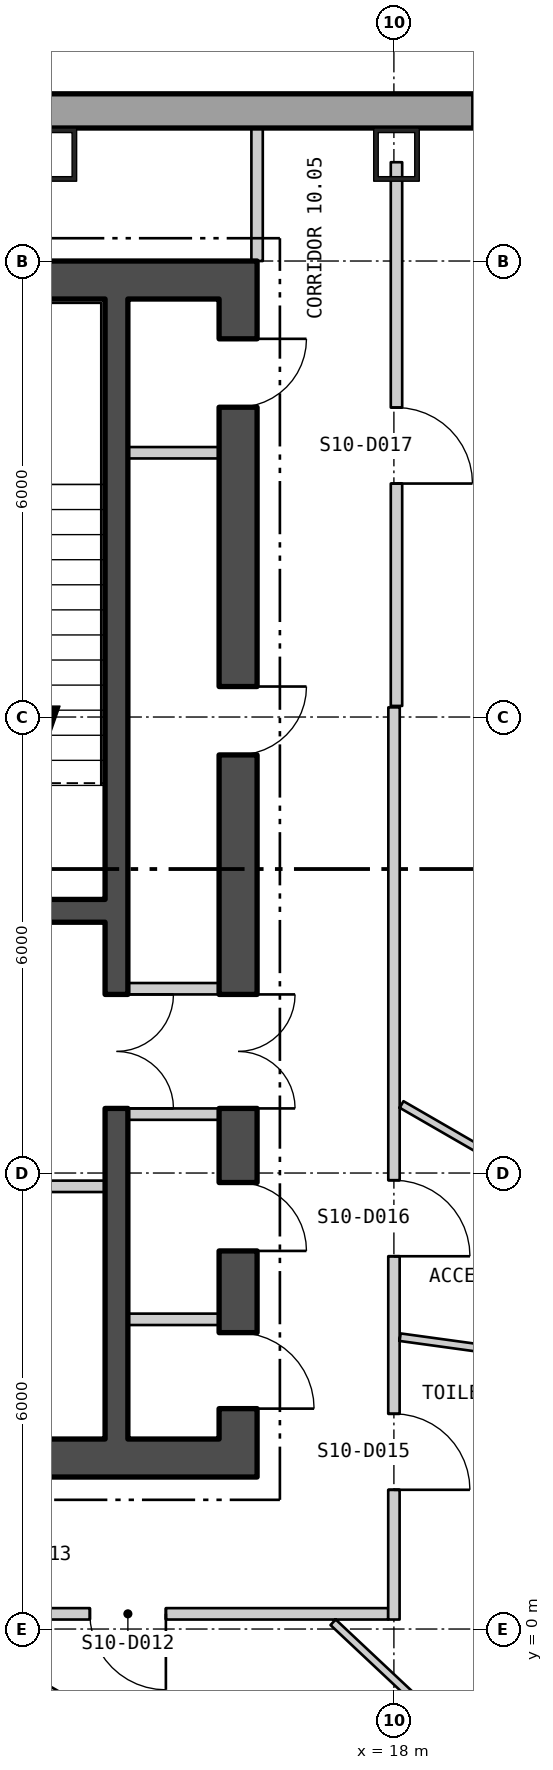
"""IFC4 building model, lengths in metres.
Left out: names, types, materials, properties, quantities, classifications, styles, units other than length and angle.
Written with IfcOpenShell. Run it as: python <this file> out.ifc"""

import sys

from ifc_helpers import new_model, si_unit, direction, frame, frame_2d, origin, origin_2d, place, context, subcontext, project, spatial, polyline, rectangle, hollow_rectangle, outline, extrude, element, fill, save


model = new_model("IFC4")
c1 = context("Model", 3, precision=1e-05, world=origin(), true_north=direction((0.0, 1.0)))
c2 = subcontext(c1, "Body", "Model", "MODEL_VIEW")
j1 = project(units=[si_unit("LENGTHUNIT", "METRE"), si_unit("PLANEANGLEUNIT", "RADIAN")], contexts=[c1])
p1 = place(None, origin())
s1 = spatial("IfcSite", under=j1, at=p1, CompositionType="ELEMENT")
p2 = place(p1, origin())
s2 = spatial("IfcBuilding", under=s1, at=p2, CompositionType="ELEMENT")
p3 = place(p2, frame((0.0, 0.0, 139.8)))
s3 = spatial("IfcBuildingStorey", under=s2, at=p3, CompositionType="ELEMENT", Elevation=139.8)
for number, where, z_axis, x_axis in (
    (1, (18.034, 19.4, 0.0), (0.0, 0.0, 1.0), (-1.0, 0.0, 0.0)),
    (2, (13.526, 19.4, 0.0), (0.0, 0.0, 1.0), (-1.0, 0.0, 0.0)),
):
    element("IfcColumn", number, at=place(p3, frame(where, z_axis=z_axis, x_axis=x_axis)), inside=s3, PredefinedType="COLUMN", context=c2, shape_type="SweptSolid", body=[
        extrude(hollow_rectangle(XDim=0.6, YDim=0.7, WallThickness=0.06, at=origin_2d()), origin(), (0.0, 0.0, 1.0), 3.9),
    ])
p4 = place(p3, frame((22.875, 19.975, -0.4), z_axis=(0.0, 0.0, 1.0), x_axis=(-1.0, 0.0, 0.0)))
e3 = element("IfcWall", 3, at=p4, inside=s3, PredefinedType="SOLIDWALL", context=c2, shape_type="SweptSolid", body=[
    extrude(outline(polyline([(-0.13, -0.225), (45.88, -0.225), (45.62, 0.225), (0.13, 0.225), (-0.13, -0.225)])), origin(), (0.0, 0.0, 1.0), 3.9),
])
p5 = place(p4, frame((1.425, 0.0, 1.3)))
e4 = element("IfcOpeningElement", 4, at=p5, cuts=e3, PredefinedType="OPENING", context=c2, shape_type="SweptSolid", body=[
    extrude(rectangle(XDim=2.4, YDim=2.0, at=frame_2d((1.2, 1.0))), frame((0.0, 0.235, 0.0), z_axis=(0.0, -1.0, 0.0), x_axis=(1.0, 0.0, 0.0)), (0.0, 0.0, 1.0), 0.47),
])
p6 = place(p4, frame((10.403, 0.0, 1.3)))
e5 = element("IfcOpeningElement", 5, at=p6, cuts=e3, PredefinedType="OPENING", context=c2, shape_type="SweptSolid", body=[
    extrude(rectangle(XDim=2.4, YDim=2.0, at=frame_2d((1.2, 1.0))), frame((0.0, 0.235, 0.0), z_axis=(0.0, -1.0, 0.0), x_axis=(1.0, 0.0, 0.0)), (0.0, 0.0, 1.0), 0.47),
])
p7 = place(p4, frame((14.912, 0.0, 1.3)))
e6 = element("IfcOpeningElement", 6, at=p7, cuts=e3, PredefinedType="OPENING", context=c2, shape_type="SweptSolid", body=[
    extrude(rectangle(XDim=2.4, YDim=2.0, at=frame_2d((1.2, 1.0))), frame((0.0, 0.235, 0.0), z_axis=(0.0, -1.0, 0.0), x_axis=(1.0, 0.0, 0.0)), (0.0, 0.0, 1.0), 0.47),
])
p8 = place(p4, frame((19.421, 0.0, 1.3)))
e7 = element("IfcOpeningElement", 7, at=p8, cuts=e3, PredefinedType="OPENING", context=c2, shape_type="SweptSolid", body=[
    extrude(rectangle(XDim=2.4, YDim=2.0, at=frame_2d((1.2, 1.0))), frame((0.0, 0.235, 0.0), z_axis=(0.0, -1.0, 0.0), x_axis=(1.0, 0.0, 0.0)), (0.0, 0.0, 1.0), 0.47),
])
p9 = place(p4, frame((23.929, 0.0, 1.3)))
e8 = element("IfcOpeningElement", 8, at=p9, cuts=e3, PredefinedType="OPENING", context=c2, shape_type="SweptSolid", body=[
    extrude(rectangle(XDim=2.4, YDim=2.0, at=frame_2d((1.2, 1.0))), frame((0.0, 0.235, 0.0), z_axis=(0.0, -1.0, 0.0), x_axis=(1.0, 0.0, 0.0)), (0.0, 0.0, 1.0), 0.47),
])
p10 = place(p4, frame((28.438, 0.0, 1.3)))
e9 = element("IfcOpeningElement", 9, at=p10, cuts=e3, PredefinedType="OPENING", context=c2, shape_type="SweptSolid", body=[
    extrude(rectangle(XDim=2.4, YDim=2.0, at=frame_2d((1.2, 1.0))), frame((0.0, 0.235, 0.0), z_axis=(0.0, -1.0, 0.0), x_axis=(1.0, 0.0, 0.0)), (0.0, 0.0, 1.0), 0.47),
])
p11 = place(p4, frame((32.947, 0.0, 1.3)))
e10 = element("IfcOpeningElement", 10, at=p11, cuts=e3, PredefinedType="OPENING", context=c2, shape_type="SweptSolid", body=[
    extrude(rectangle(XDim=2.4, YDim=2.0, at=frame_2d((1.2, 1.0))), frame((0.0, 0.235, 0.0), z_axis=(0.0, -1.0, 0.0), x_axis=(1.0, 0.0, 0.0)), (0.0, 0.0, 1.0), 0.47),
])
p12 = place(p4, frame((37.455, 0.0, 1.3)))
e11 = element("IfcOpeningElement", 11, at=p12, cuts=e3, PredefinedType="OPENING", context=c2, shape_type="SweptSolid", body=[
    extrude(rectangle(XDim=2.4, YDim=2.0, at=frame_2d((1.2, 1.0))), frame((0.0, 0.235, 0.0), z_axis=(0.0, -1.0, 0.0), x_axis=(1.0, 0.0, 0.0)), (0.0, 0.0, 1.0), 0.47),
])
p13 = place(p4, frame((41.925, 0.0, 1.3)))
e12 = element("IfcOpeningElement", 12, at=p13, cuts=e3, PredefinedType="OPENING", context=c2, shape_type="SweptSolid", body=[
    extrude(rectangle(XDim=2.4, YDim=2.0, at=frame_2d((1.2, 1.0))), frame((0.0, 0.235, 0.0), z_axis=(0.0, -1.0, 0.0), x_axis=(1.0, 0.0, 0.0)), (0.0, 0.0, 1.0), 0.47),
])
p14 = place(p3, frame((4.36, -27.198, -0.18), z_axis=(0.0, 0.0, 1.0), x_axis=(0.500000335318, 0.866025210188, 0.0)))
e13 = element("IfcWall", 13, at=p14, inside=s3, PredefinedType="SOLIDWALL", context=c2, shape_type="SweptSolid", body=[
    extrude(outline(polyline([(-0.13, -0.225), (45.88, -0.225), (45.62, 0.225), (0.13, 0.225), (-0.13, -0.225)])), origin(), (0.0, 0.0, 1.0), 3.68),
])
p15 = place(p14, frame((1.425, 0.0, 1.08)))
e14 = element("IfcOpeningElement", 14, at=p15, cuts=e13, PredefinedType="OPENING", context=c2, shape_type="SweptSolid", body=[
    extrude(rectangle(XDim=2.4, YDim=2.0, at=frame_2d((1.2, 1.0))), frame((0.0, 0.235, 0.0), z_axis=(0.0, -1.0, 0.0), x_axis=(1.0, 0.0, 0.0)), (0.0, 0.0, 1.0), 0.47),
])
p16 = place(p14, frame((5.895, 0.0, 1.08)))
e15 = element("IfcOpeningElement", 15, at=p16, cuts=e13, PredefinedType="OPENING", context=c2, shape_type="SweptSolid", body=[
    extrude(rectangle(XDim=2.4, YDim=2.0, at=frame_2d((1.2, 1.0))), frame((0.0, 0.235, 0.0), z_axis=(0.0, -1.0, 0.0), x_axis=(1.0, 0.0, 0.0)), (0.0, 0.0, 1.0), 0.47),
])
p17 = place(p14, frame((10.403, 0.0, 1.08)))
e16 = element("IfcOpeningElement", 16, at=p17, cuts=e13, PredefinedType="OPENING", context=c2, shape_type="SweptSolid", body=[
    extrude(rectangle(XDim=2.4, YDim=2.0, at=frame_2d((1.2, 1.0))), frame((0.0, 0.235, 0.0), z_axis=(0.0, -1.0, 0.0), x_axis=(1.0, 0.0, 0.0)), (0.0, 0.0, 1.0), 0.47),
])
p18 = place(p14, frame((14.912, 0.0, 1.08)))
e17 = element("IfcOpeningElement", 17, at=p18, cuts=e13, PredefinedType="OPENING", context=c2, shape_type="SweptSolid", body=[
    extrude(rectangle(XDim=2.4, YDim=2.0, at=frame_2d((1.2, 1.0))), frame((0.0, 0.235, 0.0), z_axis=(0.0, -1.0, 0.0), x_axis=(1.0, 0.0, 0.0)), (0.0, 0.0, 1.0), 0.47),
])
p19 = place(p14, frame((19.421, 0.0, 1.08)))
e18 = element("IfcOpeningElement", 18, at=p19, cuts=e13, PredefinedType="OPENING", context=c2, shape_type="SweptSolid", body=[
    extrude(rectangle(XDim=2.4, YDim=2.0, at=frame_2d((1.2, 1.0))), frame((0.0, 0.235, 0.0), z_axis=(0.0, -1.0, 0.0), x_axis=(1.0, 0.0, 0.0)), (0.0, 0.0, 1.0), 0.47),
])
p20 = place(p14, frame((23.929, 0.0, 1.08)))
e19 = element("IfcOpeningElement", 19, at=p20, cuts=e13, PredefinedType="OPENING", context=c2, shape_type="SweptSolid", body=[
    extrude(rectangle(XDim=2.4, YDim=2.0, at=frame_2d((1.2, 1.0))), frame((0.0, 0.235, 0.0), z_axis=(0.0, -1.0, 0.0), x_axis=(1.0, 0.0, 0.0)), (0.0, 0.0, 1.0), 0.47),
])
p21 = place(p14, frame((37.455, 0.0, 1.08)))
e20 = element("IfcOpeningElement", 20, at=p21, cuts=e13, PredefinedType="OPENING", context=c2, shape_type="SweptSolid", body=[
    extrude(rectangle(XDim=2.4, YDim=2.0, at=frame_2d((1.2, 1.0))), frame((0.0, 0.235, 0.0), z_axis=(0.0, -1.0, 0.0), x_axis=(1.0, 0.0, 0.0)), (0.0, 0.0, 1.0), 0.47),
])
p22 = place(p14, frame((41.925, 0.0, 1.08)))
e21 = element("IfcOpeningElement", 21, at=p22, cuts=e13, PredefinedType="OPENING", context=c2, shape_type="SweptSolid", body=[
    extrude(rectangle(XDim=2.4, YDim=2.0, at=frame_2d((1.2, 1.0))), frame((0.0, 0.235, 0.0), z_axis=(0.0, -1.0, 0.0), x_axis=(1.0, 0.0, 0.0)), (0.0, 0.0, 1.0), 0.47),
])
p23 = place(p3, frame((-16.2, 2.25, 0.0), z_axis=(0.0, 0.0, 1.0), x_axis=(1.0, 0.0, 0.0)))
e22 = element("IfcWall", 22, at=p23, inside=s3, PredefinedType="SHEAR", context=c2, shape_type="SweptSolid", body=[
    extrude(rectangle(XDim=32.4, YDim=0.5, at=frame_2d((16.2, 0.0))), origin(), (0.0, 0.0, 1.0), 3.7),
])
p24 = place(p23, frame((10.7, 0.0, 0.0)))
e23 = element("IfcOpeningElement", 23, at=p24, cuts=e22, PredefinedType="OPENING", context=c2, shape_type="SweptSolid", body=[
    extrude(rectangle(XDim=1.8, YDim=2.4, at=frame_2d((0.9, 1.2))), frame((0.0, 0.26, 0.0), z_axis=(0.0, -1.0, 0.0), x_axis=(1.0, 0.0, 0.0)), (0.0, 0.0, 1.0), 0.52),
])
p25 = place(p23, frame((20.7, 0.0, 0.0)))
e24 = element("IfcOpeningElement", 24, at=p25, cuts=e22, PredefinedType="OPENING", context=c2, shape_type="SweptSolid", body=[
    extrude(rectangle(XDim=1.8, YDim=2.4, at=frame_2d((0.9, 1.2))), frame((0.0, 0.26, 0.0), z_axis=(0.0, -1.0, 0.0), x_axis=(1.0, 0.0, 0.0)), (0.0, 0.0, 1.0), 0.52),
])
p26 = place(p3, frame((-16.2, 17.75, 0.0), z_axis=(0.0, 0.0, 1.0), x_axis=(1.0, 0.0, 0.0)))
e25 = element("IfcWall", 25, at=p26, inside=s3, PredefinedType="SHEAR", context=c2, shape_type="SweptSolid", body=[
    extrude(rectangle(XDim=32.4, YDim=0.5, at=frame_2d((16.2, 0.0))), origin(), (0.0, 0.0, 1.0), 3.7),
])
p27 = place(p3, frame((15.95, 2.5, 0.0), z_axis=(0.0, 0.0, 1.0), x_axis=(0.0, 1.0, 0.0)))
e26 = element("IfcWall", 26, at=p27, inside=s3, PredefinedType="SHEAR", context=c2, shape_type="SweptSolid", body=[
    extrude(rectangle(XDim=15.0, YDim=0.5, at=frame_2d((7.5, 0.0))), origin(), (0.0, 0.0, 1.0), 3.7),
])
p28 = place(p27, frame((4.35, 0.0, 0.0)))
e27 = element("IfcOpeningElement", 27, at=p28, cuts=e26, PredefinedType="OPENING", context=c2, shape_type="SweptSolid", body=[
    extrude(rectangle(XDim=1.5, YDim=2.1, at=frame_2d((0.75, 1.05))), frame((0.0, 0.26, 0.0), z_axis=(0.0, -1.0, 0.0), x_axis=(1.0, 0.0, 0.0)), (0.0, 0.0, 1.0), 0.52),
])
p29 = place(p27, frame((0.4, 0.0, 0.0)))
e28 = element("IfcOpeningElement", 28, at=p29, cuts=e26, PredefinedType="OPENING", context=c2, shape_type="SweptSolid", body=[
    extrude(rectangle(XDim=1.0, YDim=2.1, at=frame_2d((0.5, 1.05))), frame((0.0, 0.26, 0.0), z_axis=(0.0, -1.0, 0.0), x_axis=(1.0, 0.0, 0.0)), (0.0, 0.0, 1.0), 0.52),
])
p30 = place(p27, frame((2.475, 0.0, 0.0)))
e29 = element("IfcOpeningElement", 29, at=p30, cuts=e26, PredefinedType="OPENING", context=c2, shape_type="SweptSolid", body=[
    extrude(rectangle(XDim=0.9, YDim=2.1, at=frame_2d((0.45, 1.05))), frame((0.0, 0.26, 0.0), z_axis=(0.0, -1.0, 0.0), x_axis=(1.0, 0.0, 0.0)), (0.0, 0.0, 1.0), 0.52),
])
p31 = place(p27, frame((9.001, 0.0, 0.0)))
e30 = element("IfcOpeningElement", 30, at=p31, cuts=e26, PredefinedType="OPENING", context=c2, shape_type="SweptSolid", body=[
    extrude(rectangle(XDim=0.9, YDim=2.1, at=frame_2d((0.45, 1.05))), frame((0.0, 0.26, 0.0), z_axis=(0.0, -1.0, 0.0), x_axis=(1.0, 0.0, 0.0)), (0.0, 0.0, 1.0), 0.52),
])
p32 = place(p27, frame((13.576, 0.0, 0.0)))
e31 = element("IfcOpeningElement", 31, at=p32, cuts=e26, PredefinedType="OPENING", context=c2, shape_type="SweptSolid", body=[
    extrude(rectangle(XDim=0.9, YDim=2.1, at=frame_2d((0.45, 1.05))), frame((0.0, 0.26, 0.0), z_axis=(0.0, -1.0, 0.0), x_axis=(1.0, 0.0, 0.0)), (0.0, 0.0, 1.0), 0.52),
])
p33 = place(p3, frame((14.35, 2.5, 0.0), z_axis=(0.0, 0.0, 1.0), x_axis=(0.0, 1.0, 0.0)))
e32 = element("IfcWall", 32, at=p33, inside=s3, PredefinedType="SHEAR", context=c2, shape_type="SweptSolid", body=[
    extrude(rectangle(XDim=15.0, YDim=0.3, at=frame_2d((7.5, 0.0))), origin(), (0.0, 0.0, 1.0), 3.7),
])
p34 = place(p33, frame((4.35, 0.0, 0.0)))
e33 = element("IfcOpeningElement", 33, at=p34, cuts=e32, PredefinedType="OPENING", context=c2, shape_type="SweptSolid", body=[
    extrude(rectangle(XDim=1.5, YDim=2.1, at=frame_2d((0.75, 1.05))), frame((0.0, 0.16, 0.0), z_axis=(0.0, -1.0, 0.0), x_axis=(1.0, 0.0, 0.0)), (0.0, 0.0, 1.0), 0.32),
])
p35 = place(p3, frame((11.0, 9.45, 0.0), z_axis=(0.0, 0.0, 1.0), x_axis=(1.0, 0.0, 0.0)))
e34 = element("IfcWall", 34, at=p35, inside=s3, PredefinedType="SHEAR", context=c2, shape_type="SweptSolid", body=[
    extrude(rectangle(XDim=3.2, YDim=0.3, at=frame_2d((1.6, 0.0))), origin(), (0.0, 0.0, 1.0), 3.7),
])
p36 = place(p35, frame((1.0, 0.0, 0.0)))
e35 = element("IfcOpeningElement", 35, at=p36, cuts=e34, PredefinedType="OPENING", context=c2, shape_type="SweptSolid", body=[
    extrude(rectangle(XDim=1.2, YDim=2.1, at=frame_2d((0.6, 1.05))), frame((0.0, 0.16, 0.0), z_axis=(0.0, -1.0, 0.0), x_axis=(1.0, 0.0, 0.0)), (0.0, 0.0, 1.0), 0.32),
])
p37 = place(p3, frame((11.0, 5.825, 0.0), z_axis=(0.0, 0.0, 1.0), x_axis=(1.0, 0.0, 0.0)))
e36 = element("IfcWall", 36, at=p37, inside=s3, PredefinedType="PARTITIONING", context=c2, shape_type="SweptSolid", body=[
    extrude(rectangle(XDim=3.2, YDim=0.15, at=frame_2d((1.6, 0.0))), origin(), (0.0, 0.0, 1.0), 3.7),
])
for number, where, z_axis, x_axis in (
    (37, (14.5, 6.775, 0.0), (0.0, 0.0, 1.0), (1.0, 0.0, 0.0)),
    (38, (14.5, 8.425, 0.0), (0.0, 0.0, 1.0), (1.0, 0.0, 0.0)),
    (39, (14.5, 4.075, 0.0), (0.0, 0.0, 1.0), (1.0, 0.0, 0.0)),
    (40, (14.5, 15.477, 0.0), (0.0, 0.0, 1.0), (1.0, 0.0, 0.0)),
):
    element("IfcWall", number, at=place(p3, frame(where, z_axis=z_axis, x_axis=x_axis)), inside=s3, PredefinedType="PARTITIONING", context=c2, shape_type="SweptSolid", body=[
        extrude(rectangle(XDim=1.2, YDim=0.15, at=frame_2d((0.6, 0.0))), origin(), (0.0, 0.0, 1.0), 3.7),
    ])
p38 = place(p3, frame((7.25, 0.2, 0.0), z_axis=(0.0, 0.0, 1.0), x_axis=(1.0, 0.0, 0.0)))
e41 = element("IfcWall", 41, at=p38, inside=s3, PredefinedType="PARTITIONING", context=c2, shape_type="SweptSolid", body=[
    extrude(rectangle(XDim=10.675, YDim=0.15, at=frame_2d((5.338, 0.0))), origin(), (0.0, 0.0, 1.0), 3.7),
])
p39 = place(p38, frame((6.75, 0.0, 0.0)))
e42 = element("IfcOpeningElement", 42, at=p39, cuts=e41, PredefinedType="OPENING", context=c2, shape_type="SweptSolid", body=[
    extrude(rectangle(XDim=1.0, YDim=2.1, at=frame_2d((0.5, 1.05))), frame((0.0, 0.085, 0.0), z_axis=(0.0, -1.0, 0.0), x_axis=(1.0, 0.0, 0.0)), (0.0, 0.0, 1.0), 0.17),
])
p40 = place(p3, frame((11.916, 0.06, 0.0), z_axis=(0.0, 0.0, 1.0), x_axis=(0.866055709532, -0.499947505232, 0.0)))
e43 = element("IfcWall", 43, at=p40, inside=s3, PredefinedType="PARTITIONING", context=c2, shape_type="SweptSolid", body=[
    extrude(rectangle(XDim=6.411, YDim=0.15, at=frame_2d((3.205, 0.0))), origin(), (0.0, 0.0, 1.0), 3.7),
])
p41 = place(p3, frame((16.2, 18.0, 0.0), z_axis=(0.0, 0.0, 1.0), x_axis=(0.0, 1.0, 0.0)))
e44 = element("IfcWall", 44, at=p41, inside=s3, PredefinedType="PARTITIONING", context=c2, shape_type="SweptSolid", body=[
    extrude(rectangle(XDim=1.75, YDim=0.15, at=frame_2d((0.875, 0.0))), origin(), (0.0, 0.0, 1.0), 3.7),
])
p42 = place(p3, frame((17.2, 0.089, 0.0), z_axis=(0.0, 0.0, 1.0), x_axis=(0.728995381281, -0.684518614846, 0.0)))
e45 = element("IfcWall", 45, at=p42, inside=s3, PredefinedType="PARTITIONING", context=c2, shape_type="SweptSolid", body=[
    extrude(rectangle(XDim=2.361, YDim=0.1, at=frame_2d((1.18, 0.0))), origin(), (0.0, 0.0, 1.0), 3.7),
])
p43 = place(p3, frame((18.0, 0.125, 0.0), z_axis=(0.0, 0.0, 1.0), x_axis=(0.000166638891, 0.999999986116, 0.0)))
e46 = element("IfcWall", 46, at=p43, inside=s3, PredefinedType="PARTITIONING", context=c2, shape_type="SweptSolid", body=[
    extrude(rectangle(XDim=12.002, YDim=0.15, at=frame_2d((6.001, 0.0))), origin(), (0.0, 0.0, 1.0), 3.7),
])
p44 = place(p43, frame((1.707, 0.0, 0.0)))
e47 = element("IfcOpeningElement", 47, at=p44, cuts=e46, PredefinedType="OPENING", context=c2, shape_type="SweptSolid", body=[
    extrude(rectangle(XDim=1.0, YDim=2.1, at=frame_2d((0.5, 1.05))), frame((0.0, 0.085, 0.0), z_axis=(0.0, -1.0, 0.0), x_axis=(1.0, 0.0, 0.0)), (0.0, 0.0, 1.0), 0.17),
])
p45 = place(p43, frame((4.78, 0.0, 0.0)))
e48 = element("IfcOpeningElement", 48, at=p45, cuts=e46, PredefinedType="OPENING", context=c2, shape_type="SweptSolid", body=[
    extrude(rectangle(XDim=1.0, YDim=2.1, at=frame_2d((0.5, 1.05))), frame((0.0, 0.085, 0.0), z_axis=(0.0, -1.0, 0.0), x_axis=(1.0, 0.0, 0.0)), (0.0, 0.0, 1.0), 0.17),
])
p46 = place(p3, frame((18.034, 12.146, 0.0), z_axis=(0.0, 0.0, 1.0), x_axis=(0.0, 1.0, 0.0)))
e49 = element("IfcWall", 49, at=p46, inside=s3, PredefinedType="PARTITIONING", context=c2, shape_type="SweptSolid", body=[
    extrude(rectangle(XDim=7.154, YDim=0.15, at=frame_2d((3.577, 0.0))), origin(), (0.0, 0.0, 1.0), 3.7),
])
p47 = place(p46, frame((2.926, 0.0, 0.0)))
e50 = element("IfcOpeningElement", 50, at=p47, cuts=e49, PredefinedType="OPENING", context=c2, shape_type="SweptSolid", body=[
    extrude(rectangle(XDim=1.0, YDim=2.1, at=frame_2d((0.5, 1.05))), frame((0.0, 0.085, 0.0), z_axis=(0.0, -1.0, 0.0), x_axis=(1.0, 0.0, 0.0)), (0.0, 0.0, 1.0), 0.17),
])
p48 = place(p3, frame((18.082, 3.84, 0.0), z_axis=(0.0, 0.0, 1.0), x_axis=(0.990695786663, -0.136095034033, 0.0)))
e51 = element("IfcWall", 51, at=p48, inside=s3, PredefinedType="PARTITIONING", context=c2, shape_type="SweptSolid", body=[
    extrude(rectangle(XDim=3.681, YDim=0.1, at=frame_2d((1.841, 0.0))), origin(), (0.0, 0.0, 1.0), 3.7),
])
p49 = place(p3, frame((18.101, 6.902, 0.0), z_axis=(0.0, 0.0, 1.0), x_axis=(0.865951106384, -0.500128664797, 0.0)))
e52 = element("IfcWall", 52, at=p49, inside=s3, PredefinedType="PARTITIONING", context=c2, shape_type="SweptSolid", body=[
    extrude(rectangle(XDim=4.475, YDim=0.1, at=frame_2d((2.237, 0.0))), origin(), (0.0, 0.0, 1.0), 3.7),
])
p50 = place(p34, origin())
e53 = element("IfcDoor", 53, at=p50, inside=s3, OperationType="DOUBLE_DOOR_SINGLE_SWING", PredefinedType="DOOR", context=c2, shape_type="SweptSolid", body=[
    extrude(rectangle(XDim=1.5, YDim=2.1, at=frame_2d((0.75, 1.05))), frame((0.0, 0.025, 0.0), z_axis=(0.0, -1.0, 0.0), x_axis=(1.0, 0.0, 0.0)), (0.0, 0.0, 1.0), 0.05),
])
fill(e33, e53)
p51 = place(p28, origin())
e54 = element("IfcDoor", 54, at=p51, inside=s3, OperationType="DOUBLE_DOOR_SINGLE_SWING", PredefinedType="DOOR", context=c2, shape_type="SweptSolid", body=[
    extrude(rectangle(XDim=1.5, YDim=2.1, at=frame_2d((0.75, 1.05))), frame((0.0, 0.025, 0.0), z_axis=(0.0, -1.0, 0.0), x_axis=(1.0, 0.0, 0.0)), (0.0, 0.0, 1.0), 0.05),
])
fill(e27, e54)
p52 = place(p29, origin())
e55 = element("IfcDoor", 55, at=p52, inside=s3, OperationType="SINGLE_SWING_LEFT", PredefinedType="DOOR", context=c2, shape_type="SweptSolid", body=[
    extrude(rectangle(XDim=1.0, YDim=2.1, at=frame_2d((0.5, 1.05))), frame((0.0, 0.025, 0.0), z_axis=(0.0, -1.0, 0.0), x_axis=(1.0, 0.0, 0.0)), (0.0, 0.0, 1.0), 0.05),
])
fill(e28, e55)
p53 = place(p30, origin())
e56 = element("IfcDoor", 56, at=p53, inside=s3, OperationType="SINGLE_SWING_LEFT", PredefinedType="DOOR", context=c2, shape_type="SweptSolid", body=[
    extrude(rectangle(XDim=0.9, YDim=2.1, at=frame_2d((0.45, 1.05))), frame((0.0, 0.025, 0.0), z_axis=(0.0, -1.0, 0.0), x_axis=(1.0, 0.0, 0.0)), (0.0, 0.0, 1.0), 0.05),
])
fill(e29, e56)
p54 = place(p31, origin())
e57 = element("IfcDoor", 57, at=p54, inside=s3, OperationType="SINGLE_SWING_RIGHT", PredefinedType="DOOR", context=c2, shape_type="SweptSolid", body=[
    extrude(rectangle(XDim=0.9, YDim=2.1, at=frame_2d((0.45, 1.05))), frame((0.0, 0.025, 0.0), z_axis=(0.0, -1.0, 0.0), x_axis=(1.0, 0.0, 0.0)), (0.0, 0.0, 1.0), 0.05),
])
fill(e30, e57)
p55 = place(p32, origin())
e58 = element("IfcDoor", 58, at=p55, inside=s3, OperationType="SINGLE_SWING_RIGHT", PredefinedType="DOOR", context=c2, shape_type="SweptSolid", body=[
    extrude(rectangle(XDim=0.9, YDim=2.1, at=frame_2d((0.45, 1.05))), frame((0.0, 0.025, 0.0), z_axis=(0.0, -1.0, 0.0), x_axis=(1.0, 0.0, 0.0)), (0.0, 0.0, 1.0), 0.05),
])
fill(e31, e58)
p56 = place(p39, origin())
e59 = element("IfcDoor", 59, at=p56, inside=s3, OperationType="SINGLE_SWING_RIGHT", PredefinedType="DOOR", context=c2, shape_type="SweptSolid", body=[
    extrude(rectangle(XDim=1.0, YDim=2.1, at=frame_2d((0.5, 1.05))), frame((0.0, 0.025, 0.0), z_axis=(0.0, -1.0, 0.0), x_axis=(1.0, 0.0, 0.0)), (0.0, 0.0, 1.0), 0.05),
])
fill(e42, e59)
p57 = place(p44, origin())
e60 = element("IfcDoor", 60, at=p57, inside=s3, OperationType="SINGLE_SWING_LEFT", PredefinedType="DOOR", context=c2, shape_type="SweptSolid", body=[
    extrude(rectangle(XDim=1.0, YDim=2.1, at=frame_2d((0.5, 1.05))), frame((0.0, 0.025, 0.0), z_axis=(0.0, -1.0, 0.0), x_axis=(1.0, 0.0, 0.0)), (0.0, 0.0, 1.0), 0.05),
])
fill(e47, e60)
p58 = place(p45, origin())
e61 = element("IfcDoor", 61, at=p58, inside=s3, OperationType="SINGLE_SWING_LEFT", PredefinedType="DOOR", context=c2, shape_type="SweptSolid", body=[
    extrude(rectangle(XDim=1.0, YDim=2.1, at=frame_2d((0.5, 1.05))), frame((0.0, 0.025, 0.0), z_axis=(0.0, -1.0, 0.0), x_axis=(1.0, 0.0, 0.0)), (0.0, 0.0, 1.0), 0.05),
])
fill(e48, e61)
p59 = place(p47, origin())
e62 = element("IfcDoor", 62, at=p59, inside=s3, OperationType="SINGLE_SWING_LEFT", PredefinedType="DOOR", context=c2, shape_type="SweptSolid", body=[
    extrude(rectangle(XDim=1.0, YDim=2.1, at=frame_2d((0.5, 1.05))), frame((0.0, 0.025, 0.0), z_axis=(0.0, -1.0, 0.0), x_axis=(1.0, 0.0, 0.0)), (0.0, 0.0, 1.0), 0.05),
])
fill(e50, e62)
save(model, sys.argv[1])
